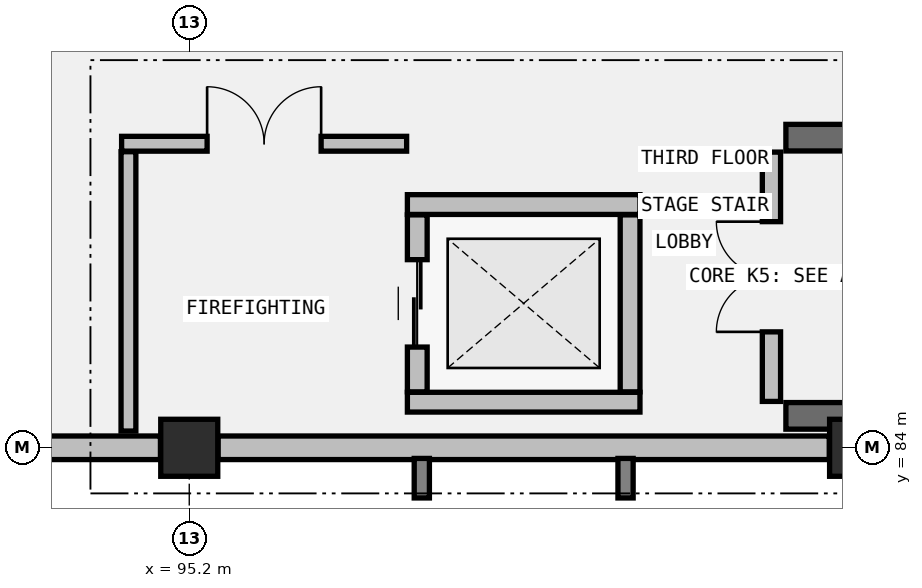
"""IFC4 building model, lengths in metres.
Left out: names, types, materials, properties, quantities, classifications, styles, units other than length and angle.
Written with IfcOpenShell. Run it as: python <this file> out.ifc"""

import sys

from ifc_helpers import new_model, si_unit, direction, frame, frame_2d, origin, origin_2d, place, context, subcontext, project, spatial, rectangle, extrude, element, fill, save


model = new_model("IFC4")
c1 = context("Model", 3, precision=1e-05, world=origin(), true_north=direction((0.0, 1.0)))
c2 = subcontext(c1, "Body", "Model", "MODEL_VIEW")
j1 = project(units=[si_unit("LENGTHUNIT", "METRE"), si_unit("PLANEANGLEUNIT", "RADIAN")], contexts=[c1])
p1 = place(None, origin())
s1 = spatial("IfcSite", under=j1, at=p1, CompositionType="ELEMENT")
p2 = place(p1, origin())
s2 = spatial("IfcBuilding", under=s1, at=p2, CompositionType="ELEMENT")
p3 = place(p2, frame((0.0, 0.0, 14.6)))
s3 = spatial("IfcBuildingStorey", under=s2, at=p3, CompositionType="ELEMENT", Elevation=14.6)
for number, where, z_axis, x_axis in (
    (1, (95.2, 84.0, 0.0), (0.0, 0.0, 1.0), (1.0, 0.0, 0.0)),
    (2, (104.0, 84.0, 0.0), (0.0, 0.0, 1.0), (1.0, 0.0, 0.0)),
):
    element("IfcColumn", number, at=place(p3, frame(where, z_axis=z_axis, x_axis=x_axis)), inside=s3, PredefinedType="COLUMN", context=c2, shape_type="SweptSolid", body=[
        extrude(rectangle(XDim=0.75, YDim=0.75, at=origin_2d()), origin(), (0.0, 0.0, 1.0), 4.6),
    ])
for number, where, z_axis, x_axis in (
    (3, (103.05, 84.42, 0.0), (0.0, 0.0, 1.0), (1.0, 0.0, 0.0)),
    (4, (111.2, 88.08, 0.0), (0.0, 0.0, 1.0), (-1.0, 0.0, 0.0)),
):
    element("IfcWall", number, at=place(p3, frame(where, z_axis=z_axis, x_axis=x_axis)), inside=s3, PredefinedType="SHEAR", context=c2, shape_type="SweptSolid", body=[
        extrude(rectangle(XDim=8.15, YDim=0.35, at=frame_2d((4.075, 0.0))), origin(), (0.0, 0.0, 1.0), 4.36),
    ])
p4 = place(p3, frame((86.804, 84.0, 0.0), z_axis=(0.0, 0.0, 1.0), x_axis=(1.0, 0.0, 0.0)))
e5 = element("IfcWall", 5, at=p4, inside=s3, PredefinedType="STANDARD", context=c2, shape_type="SweptSolid", body=[
    extrude(rectangle(XDim=8.017, YDim=0.31, at=frame_2d((4.009, 0.0))), origin(), (0.0, 0.0, 1.0), 3.538),
])
p5 = place(p3, frame((95.579, 84.0, 0.0), z_axis=(0.0, 0.0, 1.0), x_axis=(1.0, 0.0, 0.0)))
e6 = element("IfcWall", 6, at=p5, inside=s3, PredefinedType="STANDARD", context=c2, shape_type="SweptSolid", body=[
    extrude(rectangle(XDim=8.042, YDim=0.31, at=frame_2d((4.021, 0.0))), origin(), (0.0, 0.0, 1.0), 3.538),
])
p6 = place(p3, frame((102.86, 84.61, 0.0), z_axis=(0.0, 0.0, 1.0), x_axis=(0.0, 1.0, 0.0)))
e7 = element("IfcWall", 7, at=p6, inside=s3, PredefinedType="STANDARD", context=c2, shape_type="SweptSolid", body=[
    extrude(rectangle(XDim=3.28, YDim=0.24, at=frame_2d((1.64, 0.0))), origin(), (0.0, 0.0, 1.0), 4.36),
])
p7 = place(p6, frame((0.915, 0.0, 0.0)))
e8 = element("IfcOpeningElement", 8, at=p7, cuts=e7, PredefinedType="OPENING", context=c2, shape_type="SweptSolid", body=[
    extrude(rectangle(XDim=1.45, YDim=2.2, at=frame_2d((0.725, 1.1))), frame((0.0, 0.13, 0.0), z_axis=(0.0, -1.0, 0.0), x_axis=(1.0, 0.0, 0.0)), (0.0, 0.0, 1.0), 0.26),
])
for number, where, z_axis, x_axis in (
    (9, (98.07, 84.6, 0.0), (0.0, 0.0, 1.0), (1.0, 0.0, 0.0)),
    (10, (98.07, 87.2, 0.0), (0.0, 0.0, 1.0), (1.0, 0.0, 0.0)),
):
    element("IfcWall", number, at=place(p3, frame(where, z_axis=z_axis, x_axis=x_axis)), inside=s3, PredefinedType="STANDARD", context=c2, shape_type="SweptSolid", body=[
        extrude(rectangle(XDim=3.06, YDim=0.26, at=frame_2d((1.53, 0.0))), origin(), (0.0, 0.0, 1.0), 4.36),
    ])
p8 = place(p3, frame((98.2, 84.736, 0.0), z_axis=(0.0, 0.0, 1.0), x_axis=(0.0, 1.0, 0.0)))
e11 = element("IfcWall", 11, at=p8, inside=s3, PredefinedType="STANDARD", context=c2, shape_type="SweptSolid", body=[
    extrude(rectangle(XDim=2.328, YDim=0.26, at=frame_2d((1.164, 0.0))), origin(), (0.0, 0.0, 1.0), 4.36),
])
p9 = place(p8, frame((0.589, 0.0, 0.0)))
e12 = element("IfcOpeningElement", 12, at=p9, cuts=e11, PredefinedType="OPENING", context=c2, shape_type="SweptSolid", body=[
    extrude(rectangle(XDim=1.15, YDim=2.15, at=frame_2d((0.575, 1.075))), frame((0.0, 0.14, 0.0), z_axis=(0.0, -1.0, 0.0), x_axis=(1.0, 0.0, 0.0)), (0.0, 0.0, 1.0), 0.28),
])
p10 = place(p3, frame((101.0, 84.736, 0.0), z_axis=(0.0, 0.0, 1.0), x_axis=(0.0, 1.0, 0.0)))
e13 = element("IfcWall", 13, at=p10, inside=s3, PredefinedType="STANDARD", context=c2, shape_type="SweptSolid", body=[
    extrude(rectangle(XDim=2.328, YDim=0.26, at=frame_2d((1.164, 0.0))), origin(), (0.0, 0.0, 1.0), 4.36),
])
p11 = place(p3, frame((94.4, 84.22, 0.0), z_axis=(0.0, 0.0, 1.0), x_axis=(0.0, 1.0, 0.0)))
e14 = element("IfcWall", 14, at=p11, inside=s3, PredefinedType="PARTITIONING", context=c2, shape_type="SweptSolid", body=[
    extrude(rectangle(XDim=3.675, YDim=0.195, at=frame_2d((1.837, 0.0))), origin(), (0.0, 0.0, 1.0), 3.538),
])
p12 = place(p3, frame((94.31, 88.0, 0.0), z_axis=(0.0, 0.0, 1.0), x_axis=(1.0, 0.0, 0.0)))
e15 = element("IfcWall", 15, at=p12, inside=s3, PredefinedType="PARTITIONING", context=c2, shape_type="SweptSolid", body=[
    extrude(rectangle(XDim=3.75, YDim=0.195, at=frame_2d((1.875, 0.0))), origin(), (0.0, 0.0, 1.0), 4.36),
])
p13 = place(p12, frame((1.125, 0.0, 0.0)))
e16 = element("IfcOpeningElement", 16, at=p13, cuts=e15, PredefinedType="OPENING", context=c2, shape_type="SweptSolid", body=[
    extrude(rectangle(XDim=1.5, YDim=2.2, at=frame_2d((0.75, 1.1))), frame((0.0, 0.107, 0.0), z_axis=(0.0, -1.0, 0.0), x_axis=(1.0, 0.0, 0.0)), (0.0, 0.0, 1.0), 0.215),
])
p14 = place(p7, origin())
e17 = element("IfcDoor", 17, at=p14, inside=s3, OperationType="DOUBLE_DOOR_SINGLE_SWING", PredefinedType="DOOR", context=c2, shape_type="SweptSolid", body=[
    extrude(rectangle(XDim=1.45, YDim=2.2, at=frame_2d((0.725, 1.1))), frame((0.0, 0.025, 0.0), z_axis=(0.0, -1.0, 0.0), x_axis=(1.0, 0.0, 0.0)), (0.0, 0.0, 1.0), 0.05),
])
fill(e8, e17)
p15 = place(p9, origin())
e18 = element("IfcDoor", 18, at=p15, inside=s3, OperationType="SLIDING_TO_LEFT", PredefinedType="DOOR", context=c2, shape_type="SweptSolid", body=[
    extrude(rectangle(XDim=1.15, YDim=2.15, at=frame_2d((0.575, 1.075))), frame((0.0, 0.025, 0.0), z_axis=(0.0, -1.0, 0.0), x_axis=(1.0, 0.0, 0.0)), (0.0, 0.0, 1.0), 0.05),
])
fill(e12, e18)
p16 = place(p13, origin())
e19 = element("IfcDoor", 19, at=p16, inside=s3, OperationType="DOUBLE_DOOR_SINGLE_SWING", PredefinedType="DOOR", context=c2, shape_type="SweptSolid", body=[
    extrude(rectangle(XDim=1.5, YDim=2.2, at=frame_2d((0.75, 1.1))), frame((0.0, 0.025, 0.0), z_axis=(0.0, -1.0, 0.0), x_axis=(1.0, 0.0, 0.0)), (0.0, 0.0, 1.0), 0.05),
])
fill(e16, e19)
save(model, sys.argv[1])
